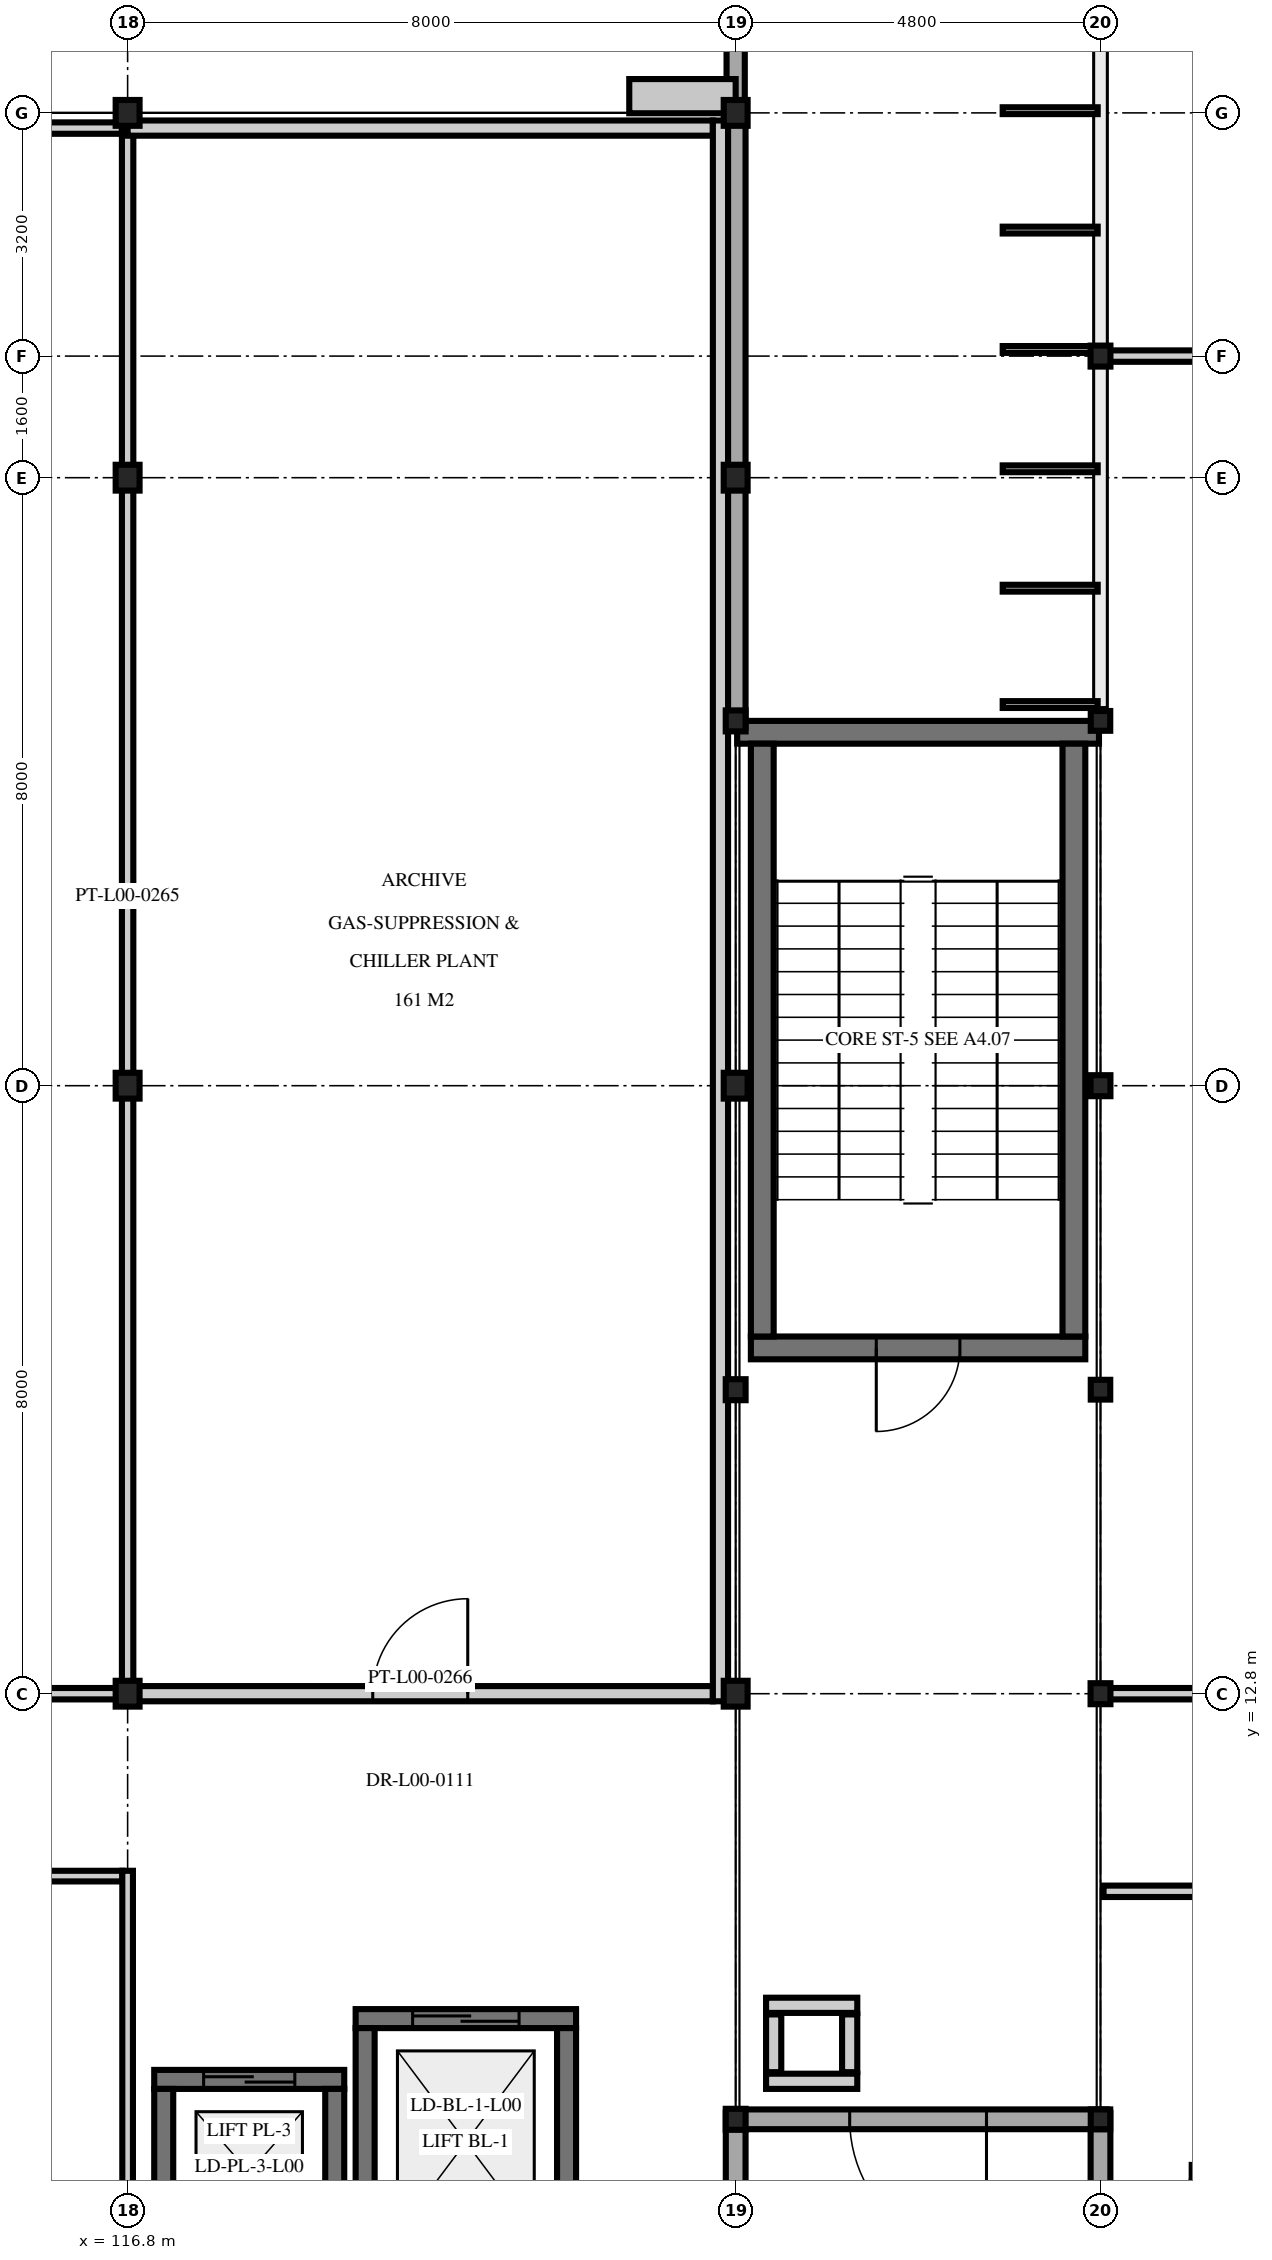
"""IFC4 building model, lengths in metres.
Left out: names, types, materials, properties, quantities, classifications, styles, units other than length and angle.
Written with IfcOpenShell. Run it as: python <this file> out.ifc"""

import sys

from ifc_helpers import new_model, si_unit, direction, frame, frame_2d, origin, origin_2d, place, context, subcontext, project, spatial, rectangle, i_section, extrude, element, fill, save


model = new_model("IFC4")
c1 = context("Model", 3, precision=1e-05, world=origin(), true_north=direction((0.0, 1.0)))
c2 = subcontext(c1, "Body", "Model", "MODEL_VIEW")
j1 = project(units=[si_unit("LENGTHUNIT", "METRE"), si_unit("PLANEANGLEUNIT", "RADIAN")], contexts=[c1])
p1 = place(None, origin())
s1 = spatial("IfcSite", under=j1, at=p1, CompositionType="ELEMENT")
p2 = place(p1, origin())
s2 = spatial("IfcBuilding", under=s1, at=p2, CompositionType="ELEMENT")
p3 = place(p2, origin())
s3 = spatial("IfcBuildingStorey", under=s2, at=p3, CompositionType="ELEMENT", Elevation=0.0)
for number, where, z_axis, x_axis in (
    (1, (116.8, 12.8, 0.0), (0.0, 0.0, 1.0), (1.0, 0.0, 0.0)),
    (2, (116.8, 20.8, 0.0), (0.0, 0.0, 1.0), (1.0, 0.0, 0.0)),
    (3, (116.8, 28.8, 0.0), (0.0, 0.0, 1.0), (1.0, 0.0, 0.0)),
    (4, (116.8, 33.6, 0.0), (0.0, 0.0, 1.0), (1.0, 0.0, 0.0)),
    (5, (124.8, 12.8, 0.0), (0.0, 0.0, 1.0), (1.0, 0.0, 0.0)),
    (6, (124.8, 20.8, 0.0), (0.0, 0.0, 1.0), (1.0, 0.0, 0.0)),
    (7, (124.8, 28.8, 0.0), (0.0, 0.0, 1.0), (1.0, 0.0, 0.0)),
    (8, (124.8, 33.6, 0.0), (0.0, 0.0, 1.0), (1.0, 0.0, 0.0)),
):
    element("IfcColumn", number, at=place(p3, frame(where, z_axis=z_axis, x_axis=x_axis)), inside=s3, PredefinedType="COLUMN", context=c2, shape_type="SweptSolid", body=[
        extrude(i_section(OverallWidth=0.314, OverallDepth=0.34, WebThickness=0.019, FlangeThickness=0.031, at=origin_2d()), origin(), (0.0, 0.0, 1.0), 5.1),
    ])
for number, where, z_axis, x_axis in (
    (9, (124.8, 7.2, 0.0), (0.0, 0.0, 1.0), (1.0, 0.0, 0.0)),
    (10, (124.8, 16.8, 0.0), (0.0, 0.0, 1.0), (1.0, 0.0, 0.0)),
    (11, (124.8, 25.6, 0.0), (0.0, 0.0, 1.0), (1.0, 0.0, 0.0)),
    (12, (129.6, 12.8, 0.0), (0.0, 0.0, 1.0), (1.0, 0.0, 0.0)),
    (13, (129.6, 20.8, 0.0), (0.0, 0.0, 1.0), (1.0, 0.0, 0.0)),
    (14, (129.6, 30.4, 0.0), (0.0, 0.0, 1.0), (1.0, 0.0, 0.0)),
):
    element("IfcColumn", number, at=place(p3, frame(where, z_axis=z_axis, x_axis=x_axis)), inside=s3, PredefinedType="COLUMN", context=c2, shape_type="SweptSolid", body=[
        extrude(i_section(OverallWidth=0.261, OverallDepth=0.276, WebThickness=0.015, FlangeThickness=0.025, at=origin_2d()), origin(), (0.0, 0.0, 1.0), 5.1),
    ])
for number, where, z_axis, x_axis in (
    (15, (129.6, 7.2, 0.0), (0.0, 0.0, 1.0), (1.0, 0.0, 0.0)),
    (16, (129.6, 16.8, 0.0), (0.0, 0.0, 1.0), (1.0, 0.0, 0.0)),
    (17, (129.6, 25.6, 0.0), (0.0, 0.0, 1.0), (1.0, 0.0, 0.0)),
):
    element("IfcColumn", number, at=place(p3, frame(where, z_axis=z_axis, x_axis=x_axis)), inside=s3, PredefinedType="COLUMN", context=c2, shape_type="SweptSolid", body=[
        extrude(i_section(OverallWidth=0.256, OverallDepth=0.26, WebThickness=0.01, FlangeThickness=0.017, at=origin_2d()), origin(), (0.0, 0.0, 1.0), 5.1),
    ])
p4 = place(p3, frame((129.4, 17.35, 0.0), z_axis=(0.0, 0.0, 1.0), x_axis=(-1.0, 0.0, 0.0)))
e18 = element("IfcWall", 18, at=p4, inside=s3, PredefinedType="SHEAR", context=c2, shape_type="SweptSolid", body=[
    extrude(rectangle(XDim=4.4, YDim=0.3, at=frame_2d((2.2, 0.0))), origin(), (0.0, 0.0, 1.0), 4.88),
])
p5 = place(p4, frame((1.65, 0.0, 0.0)))
e19 = element("IfcOpeningElement", 19, at=p5, cuts=e18, PredefinedType="OPENING", context=c2, shape_type="SweptSolid", body=[
    extrude(rectangle(XDim=1.1, YDim=2.2, at=frame_2d((0.55, 1.1))), frame((0.0, 0.16, 0.0), z_axis=(0.0, -1.0, 0.0), x_axis=(1.0, 0.0, 0.0)), (0.0, 0.0, 1.0), 0.32),
])
p6 = place(p3, frame((124.82, 25.45, 0.0), z_axis=(0.0, 0.0, 1.0), x_axis=(1.0, 0.0, 0.0)))
e20 = element("IfcWall", 20, at=p6, inside=s3, PredefinedType="SHEAR", context=c2, shape_type="SweptSolid", body=[
    extrude(rectangle(XDim=4.76, YDim=0.3, at=frame_2d((2.38, 0.0))), origin(), (0.0, 0.0, 1.0), 4.88),
])
for number, where, z_axis, x_axis in (
    (21, (125.15, 17.5, 0.0), (0.0, 0.0, 1.0), (0.0, 1.0, 0.0)),
    (22, (129.25, 25.3, 0.0), (0.0, 0.0, 1.0), (0.0, -1.0, 0.0)),
):
    element("IfcWall", number, at=place(p3, frame(where, z_axis=z_axis, x_axis=x_axis)), inside=s3, PredefinedType="SHEAR", context=c2, shape_type="SweptSolid", body=[
        extrude(rectangle(XDim=7.8, YDim=0.3, at=frame_2d((3.9, 0.0))), origin(), (0.0, 0.0, 1.0), 4.88),
    ])
p7 = place(p3, frame((117.15, 7.725, 0.0), z_axis=(0.0, 0.0, 1.0), x_axis=(1.0, 0.0, 0.0)))
e23 = element("IfcWall", 23, at=p7, inside=s3, PredefinedType="SHEAR", context=c2, shape_type="SweptSolid", body=[
    extrude(rectangle(XDim=2.5, YDim=0.25, at=frame_2d((1.25, 0.0))), origin(), (0.0, 0.0, 1.0), 4.88),
])
p8 = place(p7, frame((0.65, 0.0, 0.0)))
e24 = element("IfcOpeningElement", 24, at=p8, cuts=e23, PredefinedType="OPENING", context=c2, shape_type="SweptSolid", body=[
    extrude(rectangle(XDim=1.2, YDim=2.2, at=frame_2d((0.6, 1.1))), frame((0.0, 0.135, 0.0), z_axis=(0.0, -1.0, 0.0), x_axis=(1.0, 0.0, 0.0)), (0.0, 0.0, 1.0), 0.27),
])
for number, where, z_axis, x_axis in (
    (25, (117.275, 5.4, 0.0), (0.0, 0.0, 1.0), (0.0, 1.0, 0.0)),
    (26, (119.525, 7.6, 0.0), (0.0, 0.0, 1.0), (0.0, -1.0, 0.0)),
):
    element("IfcWall", number, at=place(p3, frame(where, z_axis=z_axis, x_axis=x_axis)), inside=s3, PredefinedType="SHEAR", context=c2, shape_type="SweptSolid", body=[
        extrude(rectangle(XDim=2.2, YDim=0.25, at=frame_2d((1.1, 0.0))), origin(), (0.0, 0.0, 1.0), 4.88),
    ])
p9 = place(p3, frame((119.8, 8.525, 0.0), z_axis=(0.0, 0.0, 1.0), x_axis=(1.0, 0.0, 0.0)))
e27 = element("IfcWall", 27, at=p9, inside=s3, PredefinedType="SHEAR", context=c2, shape_type="SweptSolid", body=[
    extrude(rectangle(XDim=2.9, YDim=0.25, at=frame_2d((1.45, 0.0))), origin(), (0.0, 0.0, 1.0), 4.88),
])
p10 = place(p9, frame((0.75, 0.0, 0.0)))
e28 = element("IfcOpeningElement", 28, at=p10, cuts=e27, PredefinedType="OPENING", context=c2, shape_type="SweptSolid", body=[
    extrude(rectangle(XDim=1.4, YDim=2.2, at=frame_2d((0.7, 1.1))), frame((0.0, 0.135, 0.0), z_axis=(0.0, -1.0, 0.0), x_axis=(1.0, 0.0, 0.0)), (0.0, 0.0, 1.0), 0.27),
])
for number, where, z_axis, x_axis in (
    (29, (119.925, 5.4, 0.0), (0.0, 0.0, 1.0), (0.0, 1.0, 0.0)),
    (30, (122.575, 8.4, 0.0), (0.0, 0.0, 1.0), (0.0, -1.0, 0.0)),
):
    element("IfcWall", number, at=place(p3, frame(where, z_axis=z_axis, x_axis=x_axis)), inside=s3, PredefinedType="SHEAR", context=c2, shape_type="SweptSolid", body=[
        extrude(rectangle(XDim=3.0, YDim=0.25, at=frame_2d((1.5, 0.0))), origin(), (0.0, 0.0, 1.0), 4.88),
    ])
for number, where, z_axis, x_axis in (
    (31, (126.4, 7.7, 0.0), (0.0, 0.0, 1.0), (-1.0, 0.0, 0.0)),
    (32, (125.2, 8.7, 0.0), (0.0, 0.0, 1.0), (1.0, 0.0, 0.0)),
):
    element("IfcWall", number, at=place(p3, frame(where, z_axis=z_axis, x_axis=x_axis)), inside=s3, PredefinedType="PARTITIONING", context=c2, shape_type="SweptSolid", body=[
        extrude(rectangle(XDim=1.2, YDim=0.2, at=frame_2d((0.6, 0.0))), origin(), (0.0, 0.0, 1.0), 4.38),
    ])
for number, where, z_axis, x_axis in (
    (33, (125.3, 7.82, 0.0), (0.0, 0.0, 1.0), (0.0, 1.0, 0.0)),
    (34, (126.3, 8.58, 0.0), (0.0, 0.0, 1.0), (0.0, -1.0, 0.0)),
):
    element("IfcWall", number, at=place(p3, frame(where, z_axis=z_axis, x_axis=x_axis)), inside=s3, PredefinedType="PARTITIONING", context=c2, shape_type="SweptSolid", body=[
        extrude(rectangle(XDim=0.76, YDim=0.2, at=frame_2d((0.38, 0.0))), origin(), (0.0, 0.0, 1.0), 4.38),
    ])
p11 = place(p3, frame((124.8, 7.285, 0.0), z_axis=(0.0, 0.0, 1.0), x_axis=(0.0, -1.0, 0.0)))
e35 = element("IfcWall", 35, at=p11, inside=s3, PredefinedType="SOLIDWALL", context=c2, shape_type="SweptSolid", body=[
    extrude(rectangle(XDim=2.57, YDim=0.26, at=frame_2d((1.285, 0.0))), origin(), (0.0, 0.0, 1.0), 4.305),
])
p12 = place(p3, frame((124.8, 33.685, 0.0), z_axis=(0.0, 0.0, 1.0), x_axis=(0.0, -1.0, 0.0)))
e36 = element("IfcWall", 36, at=p12, inside=s3, PredefinedType="SOLIDWALL", context=c2, shape_type="SweptSolid", body=[
    extrude(rectangle(XDim=8.17, YDim=0.26, at=frame_2d((4.085, 0.0))), origin(), (0.0, 0.0, 1.0), 4.305),
])
p13 = place(p3, frame((124.8, 42.685, 0.0), z_axis=(0.0, 0.0, 1.0), x_axis=(0.0, -1.0, 0.0)))
e37 = element("IfcWall", 37, at=p13, inside=s3, PredefinedType="SOLIDWALL", context=c2, shape_type="SweptSolid", body=[
    extrude(rectangle(XDim=9.17, YDim=0.24, at=frame_2d((4.585, 0.0))), origin(), (0.0, 0.0, 1.0), 4.305),
])
p14 = place(p13, frame((3.385, 0.0, 1.0)))
e38 = element("IfcOpeningElement", 38, at=p14, cuts=e37, PredefinedType="OPENING", context=c2, shape_type="SweptSolid", body=[
    extrude(rectangle(XDim=2.4, YDim=2.1, at=frame_2d((1.2, 1.05))), frame((0.0, 0.13, 0.0), z_axis=(0.0, -1.0, 0.0), x_axis=(1.0, 0.0, 0.0)), (0.0, 0.0, 1.0), 0.26),
])
p15 = place(p3, frame((129.6, 4.715, 0.0), z_axis=(0.0, 0.0, 1.0), x_axis=(0.0, 1.0, 0.0)))
e39 = element("IfcWall", 39, at=p15, inside=s3, PredefinedType="SOLIDWALL", context=c2, shape_type="SweptSolid", body=[
    extrude(rectangle(XDim=2.57, YDim=0.26, at=frame_2d((1.285, 0.0))), origin(), (0.0, 0.0, 1.0), 4.442),
])
p16 = place(p3, frame((129.685, 7.2, 0.0), z_axis=(0.0, 0.0, 1.0), x_axis=(-1.0, 0.0, 0.0)))
e40 = element("IfcWall", 40, at=p16, inside=s3, PredefinedType="SOLIDWALL", context=c2, shape_type="SweptSolid", body=[
    extrude(rectangle(XDim=4.97, YDim=0.26, at=frame_2d((2.485, 0.0))), origin(), (0.0, 0.0, 1.0), 4.405),
])
p17 = place(p16, frame((1.585, 0.0, 0.0)))
e41 = element("IfcOpeningElement", 41, at=p17, cuts=e40, PredefinedType="OPENING", context=c2, shape_type="SweptSolid", body=[
    extrude(rectangle(XDim=1.8, YDim=2.4, at=frame_2d((0.9, 1.2))), frame((0.0, 0.14, 0.0), z_axis=(0.0, -1.0, 0.0), x_axis=(1.0, 0.0, 0.0)), (0.0, 0.0, 1.0), 0.28),
])
p18 = place(p3, frame((112.27, 10.4, 0.0), z_axis=(0.0, 0.0, 1.0), x_axis=(1.0, 0.0, 0.0)))
e42 = element("IfcWall", 42, at=p18, inside=s3, PredefinedType="PARTITIONING", context=c2, shape_type="SweptSolid", body=[
    extrude(rectangle(XDim=4.46, YDim=0.14, at=frame_2d((2.23, 0.0))), origin(), (0.0, 0.0, 1.0), 4.405),
])
p19 = place(p18, frame((1.755, 0.0, 0.0)))
e43 = element("IfcOpeningElement", 43, at=p19, cuts=e42, PredefinedType="OPENING", context=c2, shape_type="SweptSolid", body=[
    extrude(rectangle(XDim=0.95, YDim=2.1, at=frame_2d((0.475, 1.05))), frame((0.0, 0.08, 0.0), z_axis=(0.0, -1.0, 0.0), x_axis=(1.0, 0.0, 0.0)), (0.0, 0.0, 1.0), 0.16),
])
p20 = place(p3, frame((116.8, 4.84, 0.0), z_axis=(0.0, 0.0, 1.0), x_axis=(0.0, 1.0, 0.0)))
e44 = element("IfcWall", 44, at=p20, inside=s3, PredefinedType="PARTITIONING", context=c2, shape_type="SweptSolid", body=[
    extrude(rectangle(XDim=5.63, YDim=0.14, at=frame_2d((2.815, 0.0))), origin(), (0.0, 0.0, 1.0), 4.305),
])
for number, where, z_axis, x_axis in (
    (45, (97.675, 12.8, 0.0), (0.0, 0.0, 1.0), (1.0, 0.0, 0.0)),
    (46, (97.675, 33.4, 0.0), (0.0, 0.0, 1.0), (1.0, 0.0, 0.0)),
):
    element("IfcWall", number, at=place(p3, frame(where, z_axis=z_axis, x_axis=x_axis)), inside=s3, PredefinedType="PARTITIONING", context=c2, shape_type="SweptSolid", body=[
        extrude(rectangle(XDim=19.05, YDim=0.15, at=frame_2d((9.525, 0.0))), origin(), (0.0, 0.0, 1.0), 4.305),
    ])
p21 = place(p3, frame((116.8, 12.725, 0.0), z_axis=(0.0, 0.0, 1.0), x_axis=(0.0, 1.0, 0.0)))
e47 = element("IfcWall", 47, at=p21, inside=s3, PredefinedType="PARTITIONING", context=c2, shape_type="SweptSolid", body=[
    extrude(rectangle(XDim=20.75, YDim=0.15, at=frame_2d((10.375, 0.0))), origin(), (0.0, 0.0, 1.0), 4.305),
])
p22 = place(p3, frame((116.8, 12.8, 0.0), z_axis=(0.0, 0.0, 1.0), x_axis=(1.0, 0.0, 0.0)))
e48 = element("IfcWall", 48, at=p22, inside=s3, PredefinedType="PARTITIONING", context=c2, shape_type="SweptSolid", body=[
    extrude(rectangle(XDim=7.7, YDim=0.2, at=frame_2d((3.85, 0.0))), origin(), (0.0, 0.0, 1.0), 4.305),
])
p23 = place(p22, frame((3.225, 0.0, 0.0)))
e49 = element("IfcOpeningElement", 49, at=p23, cuts=e48, PredefinedType="OPENING", context=c2, shape_type="SweptSolid", body=[
    extrude(rectangle(XDim=1.25, YDim=2.25, at=frame_2d((0.625, 1.125))), frame((0.0, 0.11, 0.0), z_axis=(0.0, -1.0, 0.0), x_axis=(1.0, 0.0, 0.0)), (0.0, 0.0, 1.0), 0.22),
])
p24 = place(p3, frame((116.8, 33.4, 0.0), z_axis=(0.0, 0.0, 1.0), x_axis=(1.0, 0.0, 0.0)))
e50 = element("IfcWall", 50, at=p24, inside=s3, PredefinedType="PARTITIONING", context=c2, shape_type="SweptSolid", body=[
    extrude(rectangle(XDim=7.7, YDim=0.2, at=frame_2d((3.85, 0.0))), origin(), (0.0, 0.0, 1.0), 4.305),
])
p25 = place(p3, frame((124.6, 12.7, 0.0), z_axis=(0.0, 0.0, 1.0), x_axis=(0.0, 1.0, 0.0)))
e51 = element("IfcWall", 51, at=p25, inside=s3, PredefinedType="PARTITIONING", context=c2, shape_type="SweptSolid", body=[
    extrude(rectangle(XDim=20.8, YDim=0.2, at=frame_2d((10.4, 0.0))), origin(), (0.0, 0.0, 1.0), 4.305),
])
p26 = place(p3, frame((129.64, 10.2, 0.0), z_axis=(0.0, 0.0, 1.0), x_axis=(1.0, 0.0, 0.0)))
e52 = element("IfcWall", 52, at=p26, inside=s3, PredefinedType="PARTITIONING", context=c2, shape_type="SweptSolid", body=[
    extrude(rectangle(XDim=19.085, YDim=0.15, at=frame_2d((9.542, 0.0))), origin(), (0.0, 0.0, 1.0), 4.442),
])
p27 = place(p26, frame((8.743, 0.0, 0.0)))
e53 = element("IfcOpeningElement", 53, at=p27, cuts=e52, PredefinedType="OPENING", context=c2, shape_type="SweptSolid", body=[
    extrude(rectangle(XDim=1.6, YDim=2.25, at=frame_2d((0.8, 1.125))), frame((0.0, 0.085, 0.0), z_axis=(0.0, -1.0, 0.0), x_axis=(1.0, 0.0, 0.0)), (0.0, 0.0, 1.0), 0.17),
])
for number, where, z_axis, x_axis in (
    (54, (129.64, 12.8, 0.0), (0.0, 0.0, 1.0), (1.0, 0.0, 0.0)),
    (55, (129.64, 30.4, 0.0), (0.0, 0.0, 1.0), (1.0, 0.0, 0.0)),
):
    element("IfcWall", number, at=place(p3, frame(where, z_axis=z_axis, x_axis=x_axis)), inside=s3, PredefinedType="PARTITIONING", context=c2, shape_type="SweptSolid", body=[
        extrude(rectangle(XDim=16.485, YDim=0.15, at=frame_2d((8.243, 0.0))), origin(), (0.0, 0.0, 1.0), 4.442),
    ])
p28 = place(p5, origin())
e56 = element("IfcDoor", 56, at=p28, inside=s3, OperationType="SINGLE_SWING_RIGHT", PredefinedType="DOOR", context=c2, shape_type="SweptSolid", body=[
    extrude(rectangle(XDim=1.1, YDim=2.2, at=frame_2d((0.55, 1.1))), frame((0.0, 0.025, 0.0), z_axis=(0.0, -1.0, 0.0), x_axis=(1.0, 0.0, 0.0)), (0.0, 0.0, 1.0), 0.05),
])
fill(e19, e56)
p29 = place(p8, origin())
e57 = element("IfcDoor", 57, at=p29, inside=s3, OperationType="DOUBLE_DOOR_SLIDING", PredefinedType="DOOR", context=c2, shape_type="SweptSolid", body=[
    extrude(rectangle(XDim=1.2, YDim=2.2, at=frame_2d((0.6, 1.1))), frame((0.0, 0.025, 0.0), z_axis=(0.0, -1.0, 0.0), x_axis=(1.0, 0.0, 0.0)), (0.0, 0.0, 1.0), 0.05),
])
fill(e24, e57)
p30 = place(p10, origin())
e58 = element("IfcDoor", 58, at=p30, inside=s3, OperationType="DOUBLE_DOOR_SLIDING", PredefinedType="DOOR", context=c2, shape_type="SweptSolid", body=[
    extrude(rectangle(XDim=1.4, YDim=2.2, at=frame_2d((0.7, 1.1))), frame((0.0, 0.025, 0.0), z_axis=(0.0, -1.0, 0.0), x_axis=(1.0, 0.0, 0.0)), (0.0, 0.0, 1.0), 0.05),
])
fill(e28, e58)
p31 = place(p17, origin())
e59 = element("IfcDoor", 59, at=p31, inside=s3, OperationType="SINGLE_SWING_LEFT", PredefinedType="DOOR", context=c2, shape_type="SweptSolid", body=[
    extrude(rectangle(XDim=1.8, YDim=2.4, at=frame_2d((0.9, 1.2))), frame((0.0, 0.025, 0.0), z_axis=(0.0, -1.0, 0.0), x_axis=(1.0, 0.0, 0.0)), (0.0, 0.0, 1.0), 0.05),
])
fill(e41, e59)
p32 = place(p23, origin())
e60 = element("IfcDoor", 60, at=p32, inside=s3, OperationType="SINGLE_SWING_RIGHT", PredefinedType="DOOR", context=c2, shape_type="SweptSolid", body=[
    extrude(rectangle(XDim=1.25, YDim=2.25, at=frame_2d((0.625, 1.125))), frame((0.0, 0.025, 0.0), z_axis=(0.0, -1.0, 0.0), x_axis=(1.0, 0.0, 0.0)), (0.0, 0.0, 1.0), 0.05),
])
fill(e49, e60)
save(model, sys.argv[1])
